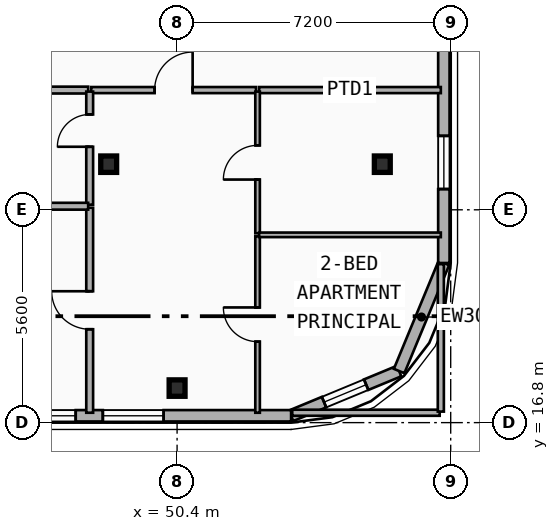
"""IFC4 building model, lengths in metres.
Left out: names, types, materials, properties, quantities, classifications, styles, units other than length and angle.
Written with IfcOpenShell. Run it as: python <this file> out.ifc"""

import sys

from ifc_helpers import new_model, si_unit, direction, frame, frame_2d, origin, origin_2d, place, context, subcontext, project, spatial, rectangle, i_section, extrude, element, fill, save


model = new_model("IFC4")
c1 = context("Model", 3, precision=1e-05, world=origin(), true_north=direction((0.0, 1.0)))
c2 = subcontext(c1, "Body", "Model", "MODEL_VIEW")
j1 = project(units=[si_unit("LENGTHUNIT", "METRE"), si_unit("PLANEANGLEUNIT", "RADIAN")], contexts=[c1])
p1 = place(None, origin())
s1 = spatial("IfcSite", under=j1, at=p1, CompositionType="ELEMENT")
p2 = place(p1, origin())
s2 = spatial("IfcBuilding", under=s1, at=p2, CompositionType="ELEMENT")
p3 = place(p2, frame((0.0, 0.0, 101.3)))
s3 = spatial("IfcBuildingStorey", under=s2, at=p3, CompositionType="ELEMENT", Elevation=101.3)
p4 = place(p3, frame((48.6, 23.6, 0.0), z_axis=(0.0, 0.0, 1.0), x_axis=(1.0, 0.0, 0.0)))
e1 = element("IfcColumn", 1, at=p4, inside=s3, PredefinedType="COLUMN", context=c2, shape_type="SweptSolid", body=[
    extrude(i_section(OverallWidth=0.418, OverallDepth=0.432, WebThickness=0.035, FlangeThickness=0.056, FilletRadius=0.015, at=origin_2d()), origin(), (0.0, 0.0, 1.0), 3.5),
])
p5 = place(p3, frame((50.4, 17.805, 0.0), z_axis=(0.0, -0.079891690793, 0.996803550226), x_axis=(1.0, 0.0, 0.0)))
e2 = element("IfcColumn", 2, at=p5, inside=s3, PredefinedType="COLUMN", context=c2, shape_type="SweptSolid", body=[
    extrude(i_section(OverallWidth=0.418, OverallDepth=0.432, WebThickness=0.035, FlangeThickness=0.056, FilletRadius=0.015, at=origin_2d()), origin(), (0.0, 0.0, 1.0), 3.511),
])
p6 = place(p3, frame((55.8, 23.6, 0.0), z_axis=(0.0, 0.0, 1.0), x_axis=(1.0, 0.0, 0.0)))
e3 = element("IfcColumn", 3, at=p6, inside=s3, PredefinedType="COLUMN", context=c2, shape_type="SweptSolid", body=[
    extrude(i_section(OverallWidth=0.418, OverallDepth=0.432, WebThickness=0.035, FlangeThickness=0.056, FilletRadius=0.015, at=origin_2d()), origin(), (0.0, 0.0, 1.0), 3.5),
])
p7 = place(p3, frame((56.243, 18.157, 0.0), z_axis=(0.0, 0.0, 1.0), x_axis=(-0.923882414032, -0.382676475685, 0.0)))
e4 = element("IfcWall", 4, at=p7, inside=s3, PredefinedType="SOLIDWALL", context=c2, shape_type="SweptSolid", body=[
    extrude(rectangle(XDim=3.077, YDim=0.3, at=frame_2d((1.539, 0.0))), origin(), (0.0, 0.0, 1.0), 3.24),
])
p8 = place(p7, frame((0.938, 0.0, 0.75)))
e5 = element("IfcOpeningElement", 5, at=p8, cuts=e4, PredefinedType="OPENING", context=c2, shape_type="SweptSolid", body=[
    extrude(rectangle(XDim=1.2, YDim=1.5, at=frame_2d((0.6, 0.75))), frame((0.0, 0.16, 0.0), z_axis=(0.0, -1.0, 0.0), x_axis=(1.0, 0.0, 0.0)), (0.0, 0.0, 1.0), 0.32),
])
p9 = place(p3, frame((57.42, 21.0, 0.0), z_axis=(0.0, 0.0, 1.0), x_axis=(-0.382636798336, -0.92389884758, 0.0)))
e6 = element("IfcWall", 6, at=p9, inside=s3, PredefinedType="SOLIDWALL", context=c2, shape_type="SweptSolid", body=[
    extrude(rectangle(XDim=3.077, YDim=0.3, at=frame_2d((1.538, 0.0))), origin(), (0.0, 0.0, 1.0), 3.24),
])
p10 = place(p3, frame((57.42, 39.0, 0.0), z_axis=(0.0, 0.0, 1.0), x_axis=(0.0, -1.0, 0.0)))
e7 = element("IfcWall", 7, at=p10, inside=s3, PredefinedType="SOLIDWALL", context=c2, shape_type="SweptSolid", body=[
    extrude(rectangle(XDim=18.0, YDim=0.3, at=frame_2d((9.0, 0.0))), origin(), (0.0, 0.0, 1.0), 3.24),
])
p11 = place(p10, frame((8.882, 0.0, 0.48)))
e8 = element("IfcOpeningElement", 8, at=p11, cuts=e7, PredefinedType="OPENING", context=c2, shape_type="SweptSolid", body=[
    extrude(rectangle(XDim=1.4, YDim=1.8, at=frame_2d((0.7, 0.9))), frame((0.0, 0.16, 0.0), z_axis=(0.0, -1.0, 0.0), x_axis=(1.0, 0.0, 0.0)), (0.0, 0.0, 1.0), 0.32),
])
p12 = place(p10, frame((3.621, 0.0, 0.48)))
e9 = element("IfcOpeningElement", 9, at=p12, cuts=e7, PredefinedType="OPENING", context=c2, shape_type="SweptSolid", body=[
    extrude(rectangle(XDim=1.4, YDim=1.8, at=frame_2d((0.7, 0.9))), frame((0.0, 0.16, 0.0), z_axis=(0.0, -1.0, 0.0), x_axis=(1.0, 0.0, 0.0)), (0.0, 0.0, 1.0), 0.32),
])
p13 = place(p10, frame((14.655, 0.0, 0.48)))
e10 = element("IfcOpeningElement", 10, at=p13, cuts=e7, PredefinedType="OPENING", context=c2, shape_type="SweptSolid", body=[
    extrude(rectangle(XDim=1.4, YDim=1.8, at=frame_2d((0.7, 0.9))), frame((0.0, 0.16, 0.0), z_axis=(0.0, -1.0, 0.0), x_axis=(1.0, 0.0, 0.0)), (0.0, 0.0, 1.0), 0.32),
])
p14 = place(p3, frame((53.4, 16.98, 0.0), z_axis=(0.0, 0.0, 1.0), x_axis=(-1.0, 0.0, 0.0)))
e11 = element("IfcWall", 11, at=p14, inside=s3, PredefinedType="SOLIDWALL", context=c2, shape_type="SweptSolid", body=[
    extrude(rectangle(XDim=49.2, YDim=0.3, at=frame_2d((24.6, 0.0))), origin(), (0.0, 0.0, 1.0), 2.86),
])
p15 = place(p14, frame((44.246, 0.0, 0.48)))
e12 = element("IfcOpeningElement", 12, at=p15, cuts=e11, PredefinedType="OPENING", context=c2, shape_type="SweptSolid", body=[
    extrude(rectangle(XDim=1.6, YDim=1.95, at=frame_2d((0.8, 0.975))), frame((0.0, 0.16, 0.0), z_axis=(0.0, -1.0, 0.0), x_axis=(1.0, 0.0, 0.0)), (0.0, 0.0, 1.0), 0.32),
])
p16 = place(p14, frame((42.333, 0.0, 0.68)))
e13 = element("IfcOpeningElement", 13, at=p16, cuts=e11, PredefinedType="OPENING", context=c2, shape_type="SweptSolid", body=[
    extrude(rectangle(XDim=1.2, YDim=1.5, at=frame_2d((0.6, 0.75))), frame((0.0, 0.16, 0.0), z_axis=(0.0, -1.0, 0.0), x_axis=(1.0, 0.0, 0.0)), (0.0, 0.0, 1.0), 0.32),
])
p17 = place(p14, frame((33.338, 0.0, 1.48)))
e14 = element("IfcOpeningElement", 14, at=p17, cuts=e11, PredefinedType="OPENING", context=c2, shape_type="SweptSolid", body=[
    extrude(rectangle(XDim=1.1, YDim=1.05, at=frame_2d((0.55, 0.525))), frame((0.0, 0.16, 0.0), z_axis=(0.0, -1.0, 0.0), x_axis=(1.0, 0.0, 0.0)), (0.0, 0.0, 1.0), 0.32),
])
p18 = place(p14, frame((38.935, 0.0, 0.48)))
e15 = element("IfcOpeningElement", 15, at=p18, cuts=e11, PredefinedType="OPENING", context=c2, shape_type="SweptSolid", body=[
    extrude(rectangle(XDim=1.2, YDim=1.5, at=frame_2d((0.6, 0.75))), frame((0.0, 0.16, 0.0), z_axis=(0.0, -1.0, 0.0), x_axis=(1.0, 0.0, 0.0)), (0.0, 0.0, 1.0), 0.32),
])
p19 = place(p14, frame((20.025, 0.0, 0.73)))
e16 = element("IfcOpeningElement", 16, at=p19, cuts=e11, PredefinedType="OPENING", context=c2, shape_type="SweptSolid", body=[
    extrude(rectangle(XDim=1.6, YDim=1.95, at=frame_2d((0.8, 0.975))), frame((0.0, 0.16, 0.0), z_axis=(0.0, -1.0, 0.0), x_axis=(1.0, 0.0, 0.0)), (0.0, 0.0, 1.0), 0.32),
])
p20 = place(p14, frame((13.65, 0.0, 0.52)))
e17 = element("IfcOpeningElement", 17, at=p20, cuts=e11, PredefinedType="OPENING", context=c2, shape_type="SweptSolid", body=[
    extrude(rectangle(XDim=1.1, YDim=1.05, at=frame_2d((0.55, 0.525))), frame((0.0, 0.16, 0.0), z_axis=(0.0, -1.0, 0.0), x_axis=(1.0, 0.0, 0.0)), (0.0, 0.0, 1.0), 0.32),
])
p21 = place(p14, frame((9.701, 0.0, 1.48)))
e18 = element("IfcOpeningElement", 18, at=p21, cuts=e11, PredefinedType="OPENING", context=c2, shape_type="SweptSolid", body=[
    extrude(rectangle(XDim=1.1, YDim=1.05, at=frame_2d((0.55, 0.525))), frame((0.0, 0.16, 0.0), z_axis=(0.0, -1.0, 0.0), x_axis=(1.0, 0.0, 0.0)), (0.0, 0.0, 1.0), 0.32),
])
p22 = place(p14, frame((3.354, 0.0, 0.48)))
e19 = element("IfcOpeningElement", 19, at=p22, cuts=e11, PredefinedType="OPENING", context=c2, shape_type="SweptSolid", body=[
    extrude(rectangle(XDim=1.6, YDim=1.95, at=frame_2d((0.8, 0.975))), frame((0.0, 0.16, 0.0), z_axis=(0.0, -1.0, 0.0), x_axis=(1.0, 0.0, 0.0)), (0.0, 0.0, 1.0), 0.32),
])
p23 = place(p14, frame((5.667, 0.0, 0.68)))
e20 = element("IfcOpeningElement", 20, at=p23, cuts=e11, PredefinedType="OPENING", context=c2, shape_type="SweptSolid", body=[
    extrude(rectangle(XDim=1.2, YDim=1.5, at=frame_2d((0.6, 0.75))), frame((0.0, 0.16, 0.0), z_axis=(0.0, -1.0, 0.0), x_axis=(1.0, 0.0, 0.0)), (0.0, 0.0, 1.0), 0.32),
])
p24 = place(p3, frame((48.14, 25.55, 0.0), z_axis=(0.0, 0.0, 1.0), x_axis=(1.0, 0.0, 0.0)))
e21 = element("IfcWall", 21, at=p24, inside=s3, PredefinedType="PARTITIONING", context=c2, shape_type="SweptSolid", body=[
    extrude(rectangle(XDim=4.338, YDim=0.16, at=frame_2d((2.169, 0.0))), origin(), (0.0, 0.0, 1.0), 2.57),
])
p25 = place(p24, frame((1.669, 0.0, 0.0)))
e22 = element("IfcOpeningElement", 22, at=p25, cuts=e21, PredefinedType="OPENING", context=c2, shape_type="SweptSolid", body=[
    extrude(rectangle(XDim=1.0, YDim=2.15, at=frame_2d((0.5, 1.075))), frame((0.0, 0.09, 0.0), z_axis=(0.0, -1.0, 0.0), x_axis=(1.0, 0.0, 0.0)), (0.0, 0.0, 1.0), 0.18),
])
p26 = place(p3, frame((45.44, 25.55, 0.0), z_axis=(0.0, 0.0, 1.0), x_axis=(1.0, 0.0, 0.0)))
e23 = element("IfcWall", 23, at=p26, inside=s3, PredefinedType="PLUMBINGWALL", context=c2, shape_type="SweptSolid", body=[
    extrude(rectangle(XDim=2.62, YDim=0.18, at=frame_2d((1.31, 0.0))), origin(), (0.0, 0.0, 1.0), 2.31),
])
p27 = place(p3, frame((52.558, 25.55, 0.0), z_axis=(0.0, 0.0, 1.0), x_axis=(1.0, 0.0, 0.0)))
e24 = element("IfcWall", 24, at=p27, inside=s3, PredefinedType="PARTITIONING", context=c2, shape_type="SweptSolid", body=[
    extrude(rectangle(XDim=4.782, YDim=0.16, at=frame_2d((2.391, 0.0))), origin(), (0.0, 0.0, 1.0), 2.57),
])
p28 = place(p3, frame((48.1, 17.06, 0.0), z_axis=(0.0, 0.0, 1.0), x_axis=(0.0, 1.0, 0.0)))
e25 = element("IfcWall", 25, at=p28, inside=s3, PredefinedType="PLUMBINGWALL", context=c2, shape_type="SweptSolid", body=[
    extrude(rectangle(XDim=5.394, YDim=0.18, at=frame_2d((2.697, 0.0))), origin(), (0.0, 0.0, 1.0), 2.72),
])
p29 = place(p28, frame((2.197, 0.0, 0.0)))
e26 = element("IfcOpeningElement", 26, at=p29, cuts=e25, PredefinedType="OPENING", context=c2, shape_type="SweptSolid", body=[
    extrude(rectangle(XDim=1.0, YDim=2.15, at=frame_2d((0.5, 1.075))), frame((0.0, 0.1, 0.0), z_axis=(0.0, -1.0, 0.0), x_axis=(1.0, 0.0, 0.0)), (0.0, 0.0, 1.0), 0.2),
])
p30 = place(p3, frame((48.1, 22.534, 0.0), z_axis=(0.0, 0.0, 1.0), x_axis=(0.0, 1.0, 0.0)))
e27 = element("IfcWall", 27, at=p30, inside=s3, PredefinedType="PLUMBINGWALL", context=c2, shape_type="SweptSolid", body=[
    extrude(rectangle(XDim=2.976, YDim=0.18, at=frame_2d((1.488, 0.0))), origin(), (0.0, 0.0, 1.0), 2.72),
])
p31 = place(p30, frame((1.524, 0.0, 0.0)))
e28 = element("IfcOpeningElement", 28, at=p31, cuts=e27, PredefinedType="OPENING", context=c2, shape_type="SweptSolid", body=[
    extrude(rectangle(XDim=0.85, YDim=2.1, at=frame_2d((0.425, 1.05))), frame((0.0, 0.1, 0.0), z_axis=(0.0, -1.0, 0.0), x_axis=(1.0, 0.0, 0.0)), (0.0, 0.0, 1.0), 0.2),
])
p32 = place(p3, frame((52.518, 17.06, 0.0), z_axis=(0.0, 0.0, 1.0), x_axis=(0.0, 1.0, 0.0)))
e29 = element("IfcWall", 29, at=p32, inside=s3, PredefinedType="PARTITIONING", context=c2, shape_type="SweptSolid", body=[
    extrude(rectangle(XDim=4.641, YDim=0.12, at=frame_2d((2.32, 0.0))), origin(), (0.0, 0.0, 1.0), 2.72),
])
p33 = place(p32, frame((1.871, 0.0, 0.0)))
e30 = element("IfcOpeningElement", 30, at=p33, cuts=e29, PredefinedType="OPENING", context=c2, shape_type="SweptSolid", body=[
    extrude(rectangle(XDim=0.9, YDim=2.1, at=frame_2d((0.45, 1.05))), frame((0.0, 0.07, 0.0), z_axis=(0.0, -1.0, 0.0), x_axis=(1.0, 0.0, 0.0)), (0.0, 0.0, 1.0), 0.14),
])
p34 = place(p3, frame((52.518, 21.781, 0.0), z_axis=(0.0, 0.0, 1.0), x_axis=(0.0, 1.0, 0.0)))
e31 = element("IfcWall", 31, at=p34, inside=s3, PredefinedType="PARTITIONING", context=c2, shape_type="SweptSolid", body=[
    extrude(rectangle(XDim=3.729, YDim=0.12, at=frame_2d((1.865, 0.0))), origin(), (0.0, 0.0, 1.0), 2.72),
])
p35 = place(p34, frame((1.415, 0.0, 0.0)))
e32 = element("IfcOpeningElement", 32, at=p35, cuts=e31, PredefinedType="OPENING", context=c2, shape_type="SweptSolid", body=[
    extrude(rectangle(XDim=0.9, YDim=2.1, at=frame_2d((0.45, 1.05))), frame((0.0, 0.07, 0.0), z_axis=(0.0, -1.0, 0.0), x_axis=(1.0, 0.0, 0.0)), (0.0, 0.0, 1.0), 0.14),
])
p36 = place(p3, frame((45.44, 22.494, 0.0), z_axis=(0.0, 0.0, 1.0), x_axis=(1.0, 0.0, 0.0)))
e33 = element("IfcWall", 33, at=p36, inside=s3, PredefinedType="PLUMBINGWALL", context=c2, shape_type="SweptSolid", body=[
    extrude(rectangle(XDim=2.62, YDim=0.18, at=frame_2d((1.31, 0.0))), origin(), (0.0, 0.0, 1.0), 2.31),
])
p37 = place(p3, frame((52.558, 21.741, 0.0), z_axis=(0.0, 0.0, 1.0), x_axis=(1.0, 0.0, 0.0)))
e34 = element("IfcWall", 34, at=p37, inside=s3, PredefinedType="PARTITIONING", context=c2, shape_type="SweptSolid", body=[
    extrude(rectangle(XDim=4.782, YDim=0.12, at=frame_2d((2.391, 0.0))), origin(), (0.0, 0.0, 1.0), 2.72),
])
p38 = place(p3, frame((53.43, 17.06, 0.0), z_axis=(0.0, 0.0, 1.0), x_axis=(1.0, 0.0, 0.0)))
e35 = element("IfcWall", 35, at=p38, inside=s3, PredefinedType="PARTITIONING", context=c2, shape_type="SweptSolid", body=[
    extrude(rectangle(XDim=3.88, YDim=0.16, at=frame_2d((1.94, 0.0))), origin(), (0.0, 0.0, 1.0), 2.72),
])
p39 = place(p3, frame((57.34, 17.09, 0.0), z_axis=(0.0, 0.0, 1.0), x_axis=(0.0, 1.0, 0.0)))
e36 = element("IfcWall", 36, at=p39, inside=s3, PredefinedType="PARTITIONING", context=c2, shape_type="SweptSolid", body=[
    extrude(rectangle(XDim=3.88, YDim=0.16, at=frame_2d((1.94, 0.0))), origin(), (0.0, 0.0, 1.0), 3.24),
])
p40 = place(p13, origin())
e37 = element("IfcWindow", 37, at=p40, inside=s3, PartitioningType="SINGLE_PANEL", PredefinedType="WINDOW", context=c2, shape_type="SweptSolid", body=[
    extrude(rectangle(XDim=1.4, YDim=1.8, at=frame_2d((0.7, 0.9))), frame((0.0, 0.03, 0.0), z_axis=(0.0, -1.0, 0.0), x_axis=(1.0, 0.0, 0.0)), (0.0, 0.0, 1.0), 0.06),
])
fill(e10, e37)
p41 = place(p22, origin())
e38 = element("IfcWindow", 38, at=p41, inside=s3, PartitioningType="SINGLE_PANEL", PredefinedType="WINDOW", context=c2, shape_type="SweptSolid", body=[
    extrude(rectangle(XDim=1.6, YDim=1.95, at=frame_2d((0.8, 0.975))), frame((0.0, 0.03, 0.0), z_axis=(0.0, -1.0, 0.0), x_axis=(1.0, 0.0, 0.0)), (0.0, 0.0, 1.0), 0.06),
])
fill(e19, e38)
p42 = place(p23, origin())
e39 = element("IfcWindow", 39, at=p42, inside=s3, PartitioningType="SINGLE_PANEL", PredefinedType="WINDOW", context=c2, shape_type="SweptSolid", body=[
    extrude(rectangle(XDim=1.2, YDim=1.5, at=frame_2d((0.6, 0.75))), frame((0.0, 0.03, 0.0), z_axis=(0.0, -1.0, 0.0), x_axis=(1.0, 0.0, 0.0)), (0.0, 0.0, 1.0), 0.06),
])
fill(e20, e39)
p43 = place(p8, origin())
e40 = element("IfcWindow", 40, at=p43, inside=s3, PartitioningType="SINGLE_PANEL", PredefinedType="WINDOW", context=c2, shape_type="SweptSolid", body=[
    extrude(rectangle(XDim=1.2, YDim=1.5, at=frame_2d((0.6, 0.75))), frame((0.0, 0.03, 0.0), z_axis=(0.0, -1.0, 0.0), x_axis=(1.0, 0.0, 0.0)), (0.0, 0.0, 1.0), 0.06),
])
fill(e5, e40)
p44 = place(p25, origin())
e41 = element("IfcDoor", 41, at=p44, inside=s3, OperationType="SINGLE_SWING_RIGHT", PredefinedType="DOOR", context=c2, shape_type="SweptSolid", body=[
    extrude(rectangle(XDim=1.0, YDim=2.15, at=frame_2d((0.5, 1.075))), frame((0.0, 0.025, 0.0), z_axis=(0.0, -1.0, 0.0), x_axis=(1.0, 0.0, 0.0)), (0.0, 0.0, 1.0), 0.05),
])
fill(e22, e41)
p45 = place(p29, origin())
e42 = element("IfcDoor", 42, at=p45, inside=s3, OperationType="SINGLE_SWING_RIGHT", PredefinedType="DOOR", context=c2, shape_type="SweptSolid", body=[
    extrude(rectangle(XDim=1.0, YDim=2.15, at=frame_2d((0.5, 1.075))), frame((0.0, 0.025, 0.0), z_axis=(0.0, -1.0, 0.0), x_axis=(1.0, 0.0, 0.0)), (0.0, 0.0, 1.0), 0.05),
])
fill(e26, e42)
p46 = place(p31, origin())
e43 = element("IfcDoor", 43, at=p46, inside=s3, OperationType="SINGLE_SWING_LEFT", PredefinedType="DOOR", context=c2, shape_type="SweptSolid", body=[
    extrude(rectangle(XDim=0.85, YDim=2.1, at=frame_2d((0.425, 1.05))), frame((0.0, 0.025, 0.0), z_axis=(0.0, -1.0, 0.0), x_axis=(1.0, 0.0, 0.0)), (0.0, 0.0, 1.0), 0.05),
])
fill(e28, e43)
p47 = place(p33, origin())
e44 = element("IfcDoor", 44, at=p47, inside=s3, OperationType="SINGLE_SWING_RIGHT", PredefinedType="DOOR", context=c2, shape_type="SweptSolid", body=[
    extrude(rectangle(XDim=0.9, YDim=2.1, at=frame_2d((0.45, 1.05))), frame((0.0, 0.025, 0.0), z_axis=(0.0, -1.0, 0.0), x_axis=(1.0, 0.0, 0.0)), (0.0, 0.0, 1.0), 0.05),
])
fill(e30, e44)
p48 = place(p35, origin())
e45 = element("IfcDoor", 45, at=p48, inside=s3, OperationType="SINGLE_SWING_LEFT", PredefinedType="DOOR", context=c2, shape_type="SweptSolid", body=[
    extrude(rectangle(XDim=0.9, YDim=2.1, at=frame_2d((0.45, 1.05))), frame((0.0, 0.025, 0.0), z_axis=(0.0, -1.0, 0.0), x_axis=(1.0, 0.0, 0.0)), (0.0, 0.0, 1.0), 0.05),
])
fill(e32, e45)
save(model, sys.argv[1])
